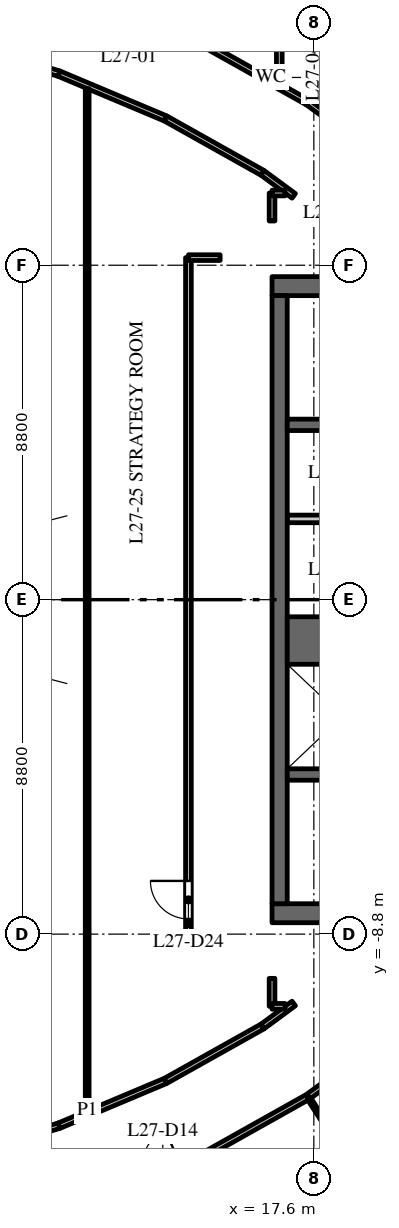
"""IFC4 building model, lengths in metres.
Left out: names, types, materials, properties, quantities, classifications, styles, units other than length and angle.
Written with IfcOpenShell. Run it as: python <this file> out.ifc"""

import sys

from ifc_helpers import new_model, si_unit, direction, frame, frame_2d, origin, place, context, subcontext, project, spatial, rectangle, extrude, element, fill, save


model = new_model("IFC4")
c1 = context("Model", 3, precision=1e-05, world=origin(), true_north=direction((0.0, 1.0)))
c2 = subcontext(c1, "Body", "Model", "MODEL_VIEW")
j1 = project(units=[si_unit("LENGTHUNIT", "METRE"), si_unit("PLANEANGLEUNIT", "RADIAN")], contexts=[c1])
p1 = place(None, origin())
s1 = spatial("IfcSite", under=j1, at=p1, CompositionType="ELEMENT")
p2 = place(p1, origin())
s2 = spatial("IfcBuilding", under=s1, at=p2, CompositionType="ELEMENT")
p3 = place(p2, frame((0.0, 0.0, 120.0)))
s3 = spatial("IfcBuildingStorey", under=s2, at=p3, CompositionType="ELEMENT", Elevation=120.0)
p4 = place(p3, frame((16.5, 8.25, 0.0), z_axis=(0.0, 0.0, 1.0), x_axis=(1.0, 0.0, 0.0)))
e1 = element("IfcWall", 1, at=p4, inside=s3, PredefinedType="SHEAR", context=c2, shape_type="SweptSolid", body=[
    extrude(rectangle(XDim=15.0, YDim=0.5, at=frame_2d((7.5, 0.0))), origin(), (0.0, 0.0, 1.0), 3.7),
])
p5 = place(p4, frame((6.9, 0.0, 0.0)))
e2 = element("IfcOpeningElement", 2, at=p5, cuts=e1, PredefinedType="OPENING", context=c2, shape_type="SweptSolid", body=[
    extrude(rectangle(XDim=1.2, YDim=2.1, at=frame_2d((0.6, 1.05))), frame((0.0, 0.26, 0.0), z_axis=(0.0, -1.0, 0.0), x_axis=(1.0, 0.0, 0.0)), (0.0, 0.0, 1.0), 0.52),
])
p6 = place(p4, frame((12.95, 0.0, 0.0)))
e3 = element("IfcOpeningElement", 3, at=p6, cuts=e1, PredefinedType="OPENING", context=c2, shape_type="SweptSolid", body=[
    extrude(rectangle(XDim=0.9, YDim=2.1, at=frame_2d((0.45, 1.05))), frame((0.0, 0.26, 0.0), z_axis=(0.0, -1.0, 0.0), x_axis=(1.0, 0.0, 0.0)), (0.0, 0.0, 1.0), 0.52),
])
p7 = place(p3, frame((16.5, -8.25, 0.0), z_axis=(0.0, 0.0, 1.0), x_axis=(1.0, 0.0, 0.0)))
e4 = element("IfcWall", 4, at=p7, inside=s3, PredefinedType="SHEAR", context=c2, shape_type="SweptSolid", body=[
    extrude(rectangle(XDim=15.0, YDim=0.5, at=frame_2d((7.5, 0.0))), origin(), (0.0, 0.0, 1.0), 3.7),
])
p8 = place(p7, frame((6.9, 0.0, 0.0)))
e5 = element("IfcOpeningElement", 5, at=p8, cuts=e4, PredefinedType="OPENING", context=c2, shape_type="SweptSolid", body=[
    extrude(rectangle(XDim=1.2, YDim=2.1, at=frame_2d((0.6, 1.05))), frame((0.0, 0.26, 0.0), z_axis=(0.0, -1.0, 0.0), x_axis=(1.0, 0.0, 0.0)), (0.0, 0.0, 1.0), 0.52),
])
p9 = place(p7, frame((12.275, 0.0, 0.0)))
e6 = element("IfcOpeningElement", 6, at=p9, cuts=e4, PredefinedType="OPENING", context=c2, shape_type="SweptSolid", body=[
    extrude(rectangle(XDim=0.9, YDim=2.1, at=frame_2d((0.45, 1.05))), frame((0.0, 0.26, 0.0), z_axis=(0.0, -1.0, 0.0), x_axis=(1.0, 0.0, 0.0)), (0.0, 0.0, 1.0), 0.52),
])
p10 = place(p3, frame((16.9, 2.125, 0.0), z_axis=(0.0, 0.0, 1.0), x_axis=(1.0, 0.0, 0.0)))
e7 = element("IfcWall", 7, at=p10, inside=s3, PredefinedType="PARTITIONING", context=c2, shape_type="SweptSolid", body=[
    extrude(rectangle(XDim=2.9, YDim=0.2, at=frame_2d((1.45, 0.0))), origin(), (0.0, 0.0, 1.0), 3.7),
])
p11 = place(p3, frame((16.7, -8.0, 0.0), z_axis=(0.0, 0.0, 1.0), x_axis=(0.0, 1.0, 0.0)))
e8 = element("IfcWall", 8, at=p11, inside=s3, PredefinedType="SHEAR", context=c2, shape_type="SweptSolid", body=[
    extrude(rectangle(XDim=16.0, YDim=0.4, at=frame_2d((8.0, 0.0))), origin(), (0.0, 0.0, 1.0), 3.7),
])
p12 = place(p3, frame((16.9, -1.075, 0.0), z_axis=(0.0, 0.0, 1.0), x_axis=(1.0, 0.0, 0.0)))
e9 = element("IfcWall", 9, at=p12, inside=s3, PredefinedType="SHEAR", context=c2, shape_type="SweptSolid", body=[
    extrude(rectangle(XDim=2.9, YDim=1.25, at=frame_2d((1.45, 0.0))), origin(), (0.0, 0.0, 1.0), 3.7),
])
p13 = place(p3, frame((16.9, 4.6, 0.0), z_axis=(0.0, 0.0, 1.0), x_axis=(1.0, 0.0, 0.0)))
e10 = element("IfcWall", 10, at=p13, inside=s3, PredefinedType="SHEAR", context=c2, shape_type="SweptSolid", body=[
    extrude(rectangle(XDim=6.18, YDim=0.3, at=frame_2d((3.09, 0.0))), origin(), (0.0, 0.0, 1.0), 3.7),
])
p14 = place(p13, frame((4.9, 0.0, 0.0)))
e11 = element("IfcOpeningElement", 11, at=p14, cuts=e10, PredefinedType="OPENING", context=c2, shape_type="SweptSolid", body=[
    extrude(rectangle(XDim=1.1, YDim=2.1, at=frame_2d((0.55, 1.05))), frame((0.0, 0.16, 0.0), z_axis=(0.0, -1.0, 0.0), x_axis=(1.0, 0.0, 0.0)), (0.0, 0.0, 1.0), 0.32),
])
p15 = place(p3, frame((16.9, -4.6, 0.0), z_axis=(0.0, 0.0, 1.0), x_axis=(1.0, 0.0, 0.0)))
e12 = element("IfcWall", 12, at=p15, inside=s3, PredefinedType="SHEAR", context=c2, shape_type="SweptSolid", body=[
    extrude(rectangle(XDim=6.18, YDim=0.3, at=frame_2d((3.09, 0.0))), origin(), (0.0, 0.0, 1.0), 3.7),
])
p16 = place(p15, frame((4.9, 0.0, 0.0)))
e13 = element("IfcOpeningElement", 13, at=p16, cuts=e12, PredefinedType="OPENING", context=c2, shape_type="SweptSolid", body=[
    extrude(rectangle(XDim=1.1, YDim=2.1, at=frame_2d((0.55, 1.05))), frame((0.0, 0.16, 0.0), z_axis=(0.0, -1.0, 0.0), x_axis=(1.0, 0.0, 0.0)), (0.0, 0.0, 1.0), 0.32),
])
p17 = place(p3, frame((7.912, -14.738, 0.0), z_axis=(0.0, 0.0, 1.0), x_axis=(0.957606118849, 0.28808075455, 0.0)))
e14 = element("IfcWall", 14, at=p17, inside=s3, PredefinedType="PARTITIONING", context=c2, shape_type="SweptSolid", body=[
    extrude(rectangle(XDim=3.117, YDim=0.15, at=frame_2d((1.559, 0.0))), origin(), (0.0, 0.0, 1.0), 2.85),
])
p18 = place(p3, frame((7.912, 14.738, 0.0), z_axis=(0.0, 0.0, 1.0), x_axis=(0.957606118849, -0.28808075455, 0.0)))
e15 = element("IfcWall", 15, at=p18, inside=s3, PredefinedType="PARTITIONING", context=c2, shape_type="SweptSolid", body=[
    extrude(rectangle(XDim=3.117, YDim=0.15, at=frame_2d((1.559, 0.0))), origin(), (0.0, 0.0, 1.0), 2.85),
])
p19 = place(p18, frame((0.65, 0.0, 0.0)))
e16 = element("IfcOpeningElement", 16, at=p19, cuts=e15, PredefinedType="OPENING", context=c2, shape_type="SweptSolid", body=[
    extrude(rectangle(XDim=1.0, YDim=2.1, at=frame_2d((0.5, 1.05))), frame((0.0, 0.085, 0.0), z_axis=(0.0, -1.0, 0.0), x_axis=(1.0, 0.0, 0.0)), (0.0, 0.0, 1.0), 0.17),
])
for number, where, z_axis, x_axis in (
    (17, (10.897, -13.84, 0.0), (0.0, 0.0, 1.0), (0.922, 0.388, 0.0)),
    (18, (10.897, 13.84, 0.0), (0.0, 0.0, 1.0), (0.922, -0.388, 0.0)),
):
    element("IfcWall", number, at=place(p3, frame(where, z_axis=z_axis, x_axis=x_axis)), inside=s3, PredefinedType="PARTITIONING", context=c2, shape_type="SweptSolid", body=[
        extrude(rectangle(XDim=3.038, YDim=0.15, at=frame_2d((1.519, 0.0))), origin(), (0.0, 0.0, 1.0), 3.7),
    ])
p20 = place(p3, frame((11.636, -13.444, 0.0), z_axis=(0.0, 0.0, 1.0), x_axis=(0.0, 1.0, 0.0)))
e19 = element("IfcWall", 19, at=p20, inside=s3, PredefinedType="PARTITIONING", context=c2, shape_type="SweptSolid", body=[
    extrude(rectangle(XDim=26.888, YDim=0.1, at=frame_2d((13.444, 0.0))), origin(), (0.0, 0.0, 1.0), 2.75),
])
for number, where, z_axis, x_axis in (
    (20, (13.697, -12.662, 0.0), (0.0, 0.0, 1.0), (0.872, 0.489, 0.0)),
    (21, (13.697, 12.662, 0.0), (0.0, 0.0, 1.0), (0.872, -0.489, 0.0)),
):
    element("IfcWall", number, at=place(p3, frame(where, z_axis=z_axis, x_axis=x_axis)), inside=s3, PredefinedType="PARTITIONING", context=c2, shape_type="SweptSolid", body=[
        extrude(rectangle(XDim=2.927, YDim=0.15, at=frame_2d((1.464, 0.0))), origin(), (0.0, 0.0, 1.0), 3.7),
    ])
p21 = place(p3, frame((14.3, -9.0, 0.0), z_axis=(0.0, 0.0, 1.0), x_axis=(0.0, 1.0, 0.0)))
e22 = element("IfcWall", 22, at=p21, inside=s3, PredefinedType="PARTITIONING", context=c2, shape_type="SweptSolid", body=[
    extrude(rectangle(XDim=18.0, YDim=0.15, at=frame_2d((9.0, 0.0))), origin(), (0.0, 0.0, 1.0), 2.75),
])
p22 = place(p21, frame((0.6, 0.0, 0.0)))
e23 = element("IfcOpeningElement", 23, at=p22, cuts=e22, PredefinedType="OPENING", context=c2, shape_type="SweptSolid", body=[
    extrude(rectangle(XDim=1.0, YDim=2.1, at=frame_2d((0.5, 1.05))), frame((0.0, 0.085, 0.0), z_axis=(0.0, -1.0, 0.0), x_axis=(1.0, 0.0, 0.0)), (0.0, 0.0, 1.0), 0.17),
])
for number, where, z_axis, x_axis in (
    (24, (14.3, -9.0, 0.0), (0.0, 0.0, 1.0), (1.0, 0.0, 0.0)),
    (25, (14.3, 9.0, 0.0), (0.0, 0.0, 1.0), (1.0, 0.0, 0.0)),
):
    element("IfcWall", number, at=place(p3, frame(where, z_axis=z_axis, x_axis=x_axis)), inside=s3, PredefinedType="PARTITIONING", context=c2, shape_type="SweptSolid", body=[
        extrude(rectangle(XDim=0.834, YDim=0.15, at=frame_2d((0.417, 0.0))), origin(), (0.0, 0.0, 1.0), 3.7),
    ])
p23 = place(p3, frame((14.665, -14.642, 0.0), z_axis=(0.0, 0.0, 1.0), x_axis=(0.871997056828, 0.4895111162, 0.0)))
e26 = element("IfcWall", 26, at=p23, inside=s3, PredefinedType="PARTITIONING", context=c2, shape_type="SweptSolid", body=[
    extrude(rectangle(XDim=3.168, YDim=0.15, at=frame_2d((1.584, 0.0))), origin(), (0.0, 0.0, 1.0), 3.7),
])
p24 = place(p3, frame((14.682, 14.632, 0.0), z_axis=(0.0, 0.0, 1.0), x_axis=(0.872147050911, -0.489243826315, 0.0)))
e27 = element("IfcWall", 27, at=p24, inside=s3, PredefinedType="PARTITIONING", context=c2, shape_type="SweptSolid", body=[
    extrude(rectangle(XDim=3.168, YDim=0.15, at=frame_2d((1.584, 0.0))), origin(), (0.0, 0.0, 1.0), 3.7),
])
for number, where, z_axis, x_axis in (
    (28, (16.25, -11.23, 0.0), (0.0, 0.0, 1.0), (0.805, 0.593, 0.0)),
    (29, (16.25, 11.23, 0.0), (0.0, 0.0, 1.0), (0.805, -0.593, 0.0)),
):
    element("IfcWall", number, at=place(p3, frame(where, z_axis=z_axis, x_axis=x_axis)), inside=s3, PredefinedType="PARTITIONING", context=c2, shape_type="SweptSolid", body=[
        extrude(rectangle(XDim=1.02, YDim=0.15, at=frame_2d((0.51, 0.0))), origin(), (0.0, 0.0, 1.0), 3.7),
    ])
p25 = place(p3, frame((16.5, -10.7, 0.0), z_axis=(0.0, 0.0, 1.0), x_axis=(0.0, 1.0, 0.0)))
e30 = element("IfcWall", 30, at=p25, inside=s3, PredefinedType="PARTITIONING", context=c2, shape_type="SweptSolid", body=[
    extrude(rectangle(XDim=0.736, YDim=0.15, at=frame_2d((0.368, 0.0))), origin(), (0.0, 0.0, 1.0), 3.7),
])
p26 = place(p3, frame((16.5, -10.7, 0.0), z_axis=(0.0, 0.0, 1.0), x_axis=(1.0, 0.0, 0.0)))
e31 = element("IfcWall", 31, at=p26, inside=s3, PredefinedType="PARTITIONING", context=c2, shape_type="SweptSolid", body=[
    extrude(rectangle(XDim=0.343, YDim=0.15, at=frame_2d((0.171, 0.0))), origin(), (0.0, 0.0, 1.0), 3.7),
])
p27 = place(p3, frame((16.5, 9.964, 0.0), z_axis=(0.0, 0.0, 1.0), x_axis=(0.0, 1.0, 0.0)))
e32 = element("IfcWall", 32, at=p27, inside=s3, PredefinedType="PARTITIONING", context=c2, shape_type="SweptSolid", body=[
    extrude(rectangle(XDim=0.736, YDim=0.15, at=frame_2d((0.368, 0.0))), origin(), (0.0, 0.0, 1.0), 3.7),
])
p28 = place(p3, frame((16.5, 10.7, 0.0), z_axis=(0.0, 0.0, 1.0), x_axis=(1.0, 0.0, 0.0)))
e33 = element("IfcWall", 33, at=p28, inside=s3, PredefinedType="PARTITIONING", context=c2, shape_type="SweptSolid", body=[
    extrude(rectangle(XDim=0.343, YDim=0.15, at=frame_2d((0.171, 0.0))), origin(), (0.0, 0.0, 1.0), 3.7),
])
p29 = place(p3, frame((16.691, 13.595, 0.0), z_axis=(0.0, 0.0, 1.0), x_axis=(0.0, 1.0, 0.0)))
e34 = element("IfcWall", 34, at=p29, inside=s3, PredefinedType="PARTITIONING", context=c2, shape_type="SweptSolid", body=[
    extrude(rectangle(XDim=1.601, YDim=0.15, at=frame_2d((0.801, 0.0))), origin(), (0.0, 0.0, 1.0), 3.7),
])
p30 = place(p3, frame((17.445, 13.082, 0.0), z_axis=(0.0, 0.0, 1.0), x_axis=(0.805185638843, -0.593022838516, 0.0)))
e35 = element("IfcWall", 35, at=p30, inside=s3, PredefinedType="PARTITIONING", context=c2, shape_type="SweptSolid", body=[
    extrude(rectangle(XDim=3.073, YDim=0.15, at=frame_2d((1.536, 0.0))), origin(), (0.0, 0.0, 1.0), 3.7),
])
p31 = place(p3, frame((17.447, -13.085, 0.0), z_axis=(0.0, 0.0, 1.0), x_axis=(0.542325736183, -0.840168314015, 0.0)))
e36 = element("IfcWall", 36, at=p31, inside=s3, PredefinedType="PARTITIONING", context=c2, shape_type="SweptSolid", body=[
    extrude(rectangle(XDim=10.066, YDim=0.1, at=frame_2d((5.033, 0.0))), origin(), (0.0, 0.0, 1.0), 3.7),
])
p32 = place(p3, frame((17.461, -13.07, 0.0), z_axis=(0.0, 0.0, 1.0), x_axis=(0.805228684186, 0.592964388613, 0.0)))
e37 = element("IfcWall", 37, at=p32, inside=s3, PredefinedType="PARTITIONING", context=c2, shape_type="SweptSolid", body=[
    extrude(rectangle(XDim=3.052, YDim=0.15, at=frame_2d((1.526, 0.0))), origin(), (0.0, 0.0, 1.0), 3.7),
])
p33 = place(p22, origin())
e38 = element("IfcDoor", 38, at=p33, inside=s3, OperationType="SINGLE_SWING_RIGHT", PredefinedType="DOOR", context=c2, shape_type="SweptSolid", body=[
    extrude(rectangle(XDim=1.0, YDim=2.1, at=frame_2d((0.5, 1.05))), frame((0.0, 0.025, 0.0), z_axis=(0.0, -1.0, 0.0), x_axis=(1.0, 0.0, 0.0)), (0.0, 0.0, 1.0), 0.05),
])
fill(e23, e38)
save(model, sys.argv[1])
